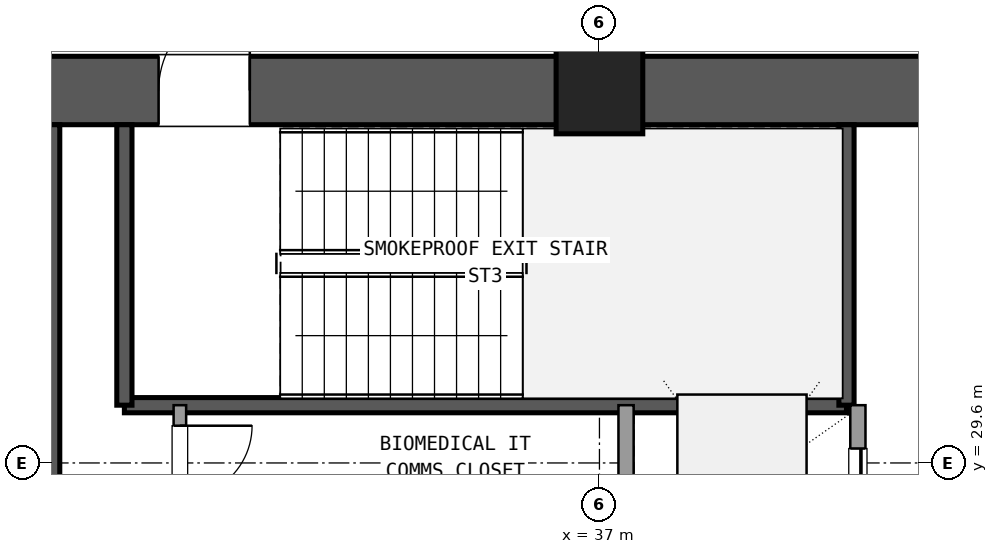
"""IFC4 building model, lengths in metres.
Left out: names, types, materials, properties, quantities, classifications, styles, units other than length and angle.
Written with IfcOpenShell. Run it as: python <this file> out.ifc"""

import sys

from ifc_helpers import new_model, si_unit, direction, frame, frame_2d, origin, origin_2d, place, context, subcontext, project, spatial, rectangle, extrude, element, fill, save


model = new_model("IFC4")
c1 = context("Model", 3, precision=1e-05, world=origin(), true_north=direction((0.0, 1.0)))
c2 = subcontext(c1, "Body", "Model", "MODEL_VIEW")
j1 = project(units=[si_unit("LENGTHUNIT", "METRE"), si_unit("PLANEANGLEUNIT", "RADIAN")], contexts=[c1])
p1 = place(None, origin())
s1 = spatial("IfcSite", under=j1, at=p1, CompositionType="ELEMENT")
p2 = place(p1, origin())
s2 = spatial("IfcBuilding", under=s1, at=p2, CompositionType="ELEMENT")
p3 = place(p2, frame((0.0, 0.0, 9.9)))
s3 = spatial("IfcBuildingStorey", under=s2, at=p3, CompositionType="ELEMENT", Elevation=9.9)
p4 = place(p3, frame((37.0, 34.5, 0.0), z_axis=(0.0, 0.0, 1.0), x_axis=(1.0, 0.0, 0.0)))
e1 = element("IfcColumn", 1, at=p4, inside=s3, PredefinedType="COLUMN", context=c2, shape_type="SweptSolid", body=[
    extrude(rectangle(XDim=1.14, YDim=1.14, at=origin_2d()), origin(), (0.0, 0.0, 1.0), 4.5),
])
p5 = place(p3, frame((47.635, 34.5, 0.0), z_axis=(0.0, 0.0, 1.0), x_axis=(-1.0, 0.0, 0.0)))
e2 = element("IfcWall", 2, at=p5, inside=s3, PredefinedType="SHEAR", context=c2, shape_type="SweptSolid", body=[
    extrude(rectangle(XDim=10.07, YDim=0.9, at=frame_2d((5.035, 0.0))), origin(), (0.0, 0.0, 1.0), 4.2),
])
p6 = place(p5, frame((4.535, 0.0, 0.0)))
e3 = element("IfcOpeningElement", 3, at=p6, cuts=e2, PredefinedType="OPENING", context=c2, shape_type="SweptSolid", body=[
    extrude(rectangle(XDim=1.6, YDim=2.2, at=frame_2d((0.8, 1.1))), frame((0.0, 0.46, 0.0), z_axis=(0.0, -1.0, 0.0), x_axis=(1.0, 0.0, 0.0)), (0.0, 0.0, 1.0), 0.92),
])
p7 = place(p3, frame((36.435, 34.5, 0.0), z_axis=(0.0, 0.0, 1.0), x_axis=(-1.0, 0.0, 0.0)))
e4 = element("IfcWall", 4, at=p7, inside=s3, PredefinedType="SHEAR", context=c2, shape_type="SweptSolid", body=[
    extrude(rectangle(XDim=10.07, YDim=0.9, at=frame_2d((5.035, 0.0))), origin(), (0.0, 0.0, 1.0), 4.2),
])
p8 = place(p7, frame((4.035, 0.0, 0.0)))
e5 = element("IfcOpeningElement", 5, at=p8, cuts=e4, PredefinedType="OPENING", context=c2, shape_type="SweptSolid", body=[
    extrude(rectangle(XDim=1.2, YDim=2.15, at=frame_2d((0.6, 1.075))), frame((0.0, 0.46, 0.0), z_axis=(0.0, -1.0, 0.0), x_axis=(1.0, 0.0, 0.0)), (0.0, 0.0, 1.0), 0.92),
])
p9 = place(p3, frame((29.8, 24.65, 0.0), z_axis=(0.0, 0.0, 1.0), x_axis=(0.0, 1.0, 0.0)))
e6 = element("IfcWall", 6, at=p9, inside=s3, PredefinedType="SHEAR", context=c2, shape_type="SweptSolid", body=[
    extrude(rectangle(XDim=9.4, YDim=0.2, at=frame_2d((4.7, 0.0))), origin(), (0.0, 0.0, 1.0), 4.2),
])
p10 = place(p3, frame((30.75, 30.36, 0.0), z_axis=(0.0, 0.0, 1.0), x_axis=(1.0, 0.0, 0.0)))
e7 = element("IfcWall", 7, at=p10, inside=s3, PredefinedType="SHEAR", context=c2, shape_type="SweptSolid", body=[
    extrude(rectangle(XDim=9.5, YDim=0.2, at=frame_2d((4.75, 0.0))), origin(), (0.0, 0.0, 1.0), 4.2),
])
for number, where, z_axis, x_axis in (
    (8, (30.75, 30.36, 0.0), (0.0, 0.0, 1.0), (0.0, 1.0, 0.0)),
    (9, (40.25, 30.36, 0.0), (0.0, 0.0, 1.0), (0.0, 1.0, 0.0)),
):
    element("IfcWall", number, at=place(p3, frame(where, z_axis=z_axis, x_axis=x_axis)), inside=s3, PredefinedType="SHEAR", context=c2, shape_type="SweptSolid", body=[
        extrude(rectangle(XDim=3.69, YDim=0.2, at=frame_2d((1.845, 0.0))), origin(), (0.0, 0.0, 1.0), 4.2),
    ])
p11 = place(p3, frame((37.35, 23.54, 0.0), z_axis=(0.0, 0.0, 1.0), x_axis=(0.0, 1.0, 0.0)))
e10 = element("IfcWall", 10, at=p11, inside=s3, PredefinedType="SOLIDWALL", context=c2, shape_type="SweptSolid", body=[
    extrude(rectangle(XDim=6.82, YDim=0.2, at=frame_2d((3.41, 0.0))), origin(), (0.0, 0.0, 1.0), 3.21),
])
p12 = place(p3, frame((40.4, 23.54, 0.0), z_axis=(0.0, 0.0, 1.0), x_axis=(0.0, 1.0, 0.0)))
e11 = element("IfcWall", 11, at=p12, inside=s3, PredefinedType="SOLIDWALL", context=c2, shape_type="SweptSolid", body=[
    extrude(rectangle(XDim=6.82, YDim=0.2, at=frame_2d((3.41, 0.0))), origin(), (0.0, 0.0, 1.0), 3.21),
])
p13 = place(p12, frame((0.35, 0.0, 0.0)))
e12 = element("IfcOpeningElement", 12, at=p13, cuts=e11, PredefinedType="OPENING", context=c2, shape_type="SweptSolid", body=[
    extrude(rectangle(XDim=1.4, YDim=2.2, at=frame_2d((0.7, 1.1))), frame((0.0, 0.11, 0.0), z_axis=(0.0, -1.0, 0.0), x_axis=(1.0, 0.0, 0.0)), (0.0, 0.0, 1.0), 0.22),
])
p14 = place(p12, frame((2.65, 0.0, 0.0)))
e13 = element("IfcOpeningElement", 13, at=p14, cuts=e11, PredefinedType="OPENING", context=c2, shape_type="SweptSolid", body=[
    extrude(rectangle(XDim=1.4, YDim=2.2, at=frame_2d((0.7, 1.1))), frame((0.0, 0.11, 0.0), z_axis=(0.0, -1.0, 0.0), x_axis=(1.0, 0.0, 0.0)), (0.0, 0.0, 1.0), 0.22),
])
p15 = place(p12, frame((4.85, 0.0, 0.0)))
e14 = element("IfcOpeningElement", 14, at=p15, cuts=e11, PredefinedType="OPENING", context=c2, shape_type="SweptSolid", body=[
    extrude(rectangle(XDim=1.4, YDim=2.2, at=frame_2d((0.7, 1.1))), frame((0.0, 0.11, 0.0), z_axis=(0.0, -1.0, 0.0), x_axis=(1.0, 0.0, 0.0)), (0.0, 0.0, 1.0), 0.22),
])
p16 = place(p3, frame((31.48, 26.32, 0.0), z_axis=(0.0, 0.0, 1.0), x_axis=(0.0, 1.0, 0.0)))
e15 = element("IfcWall", 15, at=p16, inside=s3, PredefinedType="PLUMBINGWALL", context=c2, shape_type="SweptSolid", body=[
    extrude(rectangle(XDim=4.04, YDim=0.165, at=frame_2d((2.02, 0.0))), origin(), (0.0, 0.0, 1.0), 3.21),
])
p17 = place(p16, frame((0.18, 0.0, 0.0)))
e16 = element("IfcOpeningElement", 16, at=p17, cuts=e15, PredefinedType="OPENING", context=c2, shape_type="SweptSolid", body=[
    extrude(rectangle(XDim=0.95, YDim=2.1, at=frame_2d((0.475, 1.05))), frame((0.0, 0.093, 0.0), z_axis=(0.0, -1.0, 0.0), x_axis=(1.0, 0.0, 0.0)), (0.0, 0.0, 1.0), 0.185),
])
p18 = place(p16, frame((1.5, 0.0, 0.0)))
e17 = element("IfcOpeningElement", 17, at=p18, cuts=e15, PredefinedType="OPENING", context=c2, shape_type="SweptSolid", body=[
    extrude(rectangle(XDim=0.95, YDim=2.1, at=frame_2d((0.475, 1.05))), frame((0.0, 0.093, 0.0), z_axis=(0.0, -1.0, 0.0), x_axis=(1.0, 0.0, 0.0)), (0.0, 0.0, 1.0), 0.185),
])
p19 = place(p16, frame((2.82, 0.0, 0.0)))
e18 = element("IfcOpeningElement", 18, at=p19, cuts=e15, PredefinedType="OPENING", context=c2, shape_type="SweptSolid", body=[
    extrude(rectangle(XDim=0.95, YDim=2.1, at=frame_2d((0.475, 1.05))), frame((0.0, 0.093, 0.0), z_axis=(0.0, -1.0, 0.0), x_axis=(1.0, 0.0, 0.0)), (0.0, 0.0, 1.0), 0.185),
])
p20 = place(p8, frame((1.2, 0.0, 0.0), z_axis=(0.0, 0.0, 1.0), x_axis=(-1.0, 0.0, 0.0)))
e19 = element("IfcDoor", 19, at=p20, inside=s3, OperationType="SINGLE_SWING_LEFT", PredefinedType="DOOR", context=c2, shape_type="SweptSolid", body=[
    extrude(rectangle(XDim=1.2, YDim=2.15, at=frame_2d((0.6, 1.075))), frame((0.0, 0.025, 0.0), z_axis=(0.0, -1.0, 0.0), x_axis=(1.0, 0.0, 0.0)), (0.0, 0.0, 1.0), 0.05),
])
fill(e5, e19)
p21 = place(p15, origin())
e20 = element("IfcDoor", 20, at=p21, inside=s3, OperationType="SLIDING_TO_RIGHT", PredefinedType="DOOR", context=c2, shape_type="SweptSolid", body=[
    extrude(rectangle(XDim=1.4, YDim=2.2, at=frame_2d((0.7, 1.1))), frame((0.0, 0.025, 0.0), z_axis=(0.0, -1.0, 0.0), x_axis=(1.0, 0.0, 0.0)), (0.0, 0.0, 1.0), 0.05),
])
fill(e14, e20)
p22 = place(p19, frame((0.95, 0.0, 0.0), z_axis=(0.0, 0.0, 1.0), x_axis=(-1.0, 0.0, 0.0)))
e21 = element("IfcDoor", 21, at=p22, inside=s3, OperationType="SINGLE_SWING_RIGHT", PredefinedType="DOOR", context=c2, shape_type="SweptSolid", body=[
    extrude(rectangle(XDim=0.95, YDim=2.1, at=frame_2d((0.475, 1.05))), frame((0.0, 0.025, 0.0), z_axis=(0.0, -1.0, 0.0), x_axis=(1.0, 0.0, 0.0)), (0.0, 0.0, 1.0), 0.05),
])
fill(e18, e21)
save(model, sys.argv[1])
